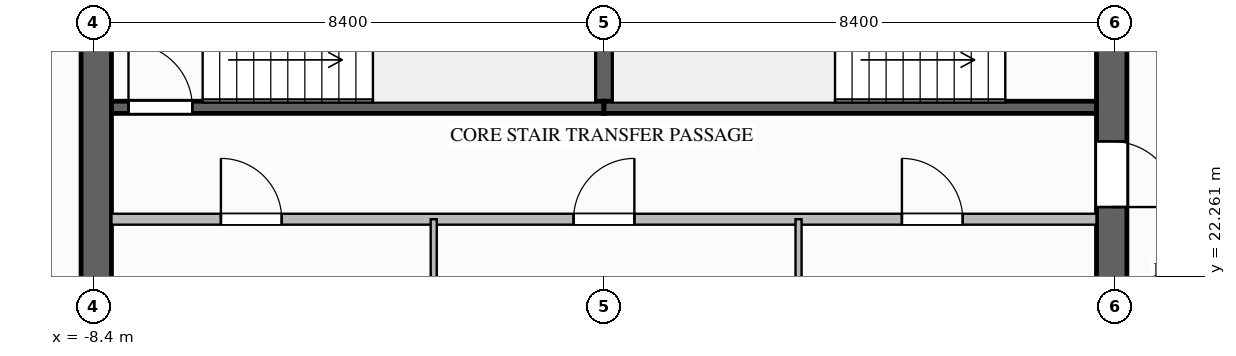
"""IFC4 building model, lengths in metres.
Left out: names, types, materials, properties, quantities, classifications, styles, units other than length and angle.
Written with IfcOpenShell. Run it as: python <this file> out.ifc"""

import sys

from ifc_helpers import new_model, si_unit, direction, frame, frame_2d, origin, place, context, subcontext, project, spatial, rectangle, extrude, element, fill, save


model = new_model("IFC4")
c1 = context("Model", 3, precision=1e-05, world=origin(), true_north=direction((0.0, 1.0)))
c2 = subcontext(c1, "Body", "Model", "MODEL_VIEW")
j1 = project(units=[si_unit("LENGTHUNIT", "METRE"), si_unit("PLANEANGLEUNIT", "RADIAN")], contexts=[c1])
p1 = place(None, origin())
s1 = spatial("IfcSite", under=j1, at=p1, CompositionType="ELEMENT")
p2 = place(p1, origin())
s2 = spatial("IfcBuilding", under=s1, at=p2, CompositionType="ELEMENT")
p3 = place(p2, frame((0.0, 0.0, 237.5)))
s3 = spatial("IfcBuildingStorey", under=s2, at=p3, CompositionType="ELEMENT", Elevation=237.5)
p4 = place(p3, frame((8.35, 35.1, 0.0), z_axis=(0.0, 0.0, 1.0), x_axis=(0.0, -1.0, 0.0)))
e1 = element("IfcWall", 1, at=p4, inside=s3, PredefinedType="SHEAR", context=c2, shape_type="SweptSolid", body=[
    extrude(rectangle(XDim=16.2, YDim=0.5, at=frame_2d((8.1, 0.0))), origin(), (0.0, 0.0, 1.0), 3.6),
])
p5 = place(p4, frame((3.08, 0.0, 0.0)))
e2 = element("IfcOpeningElement", 2, at=p5, cuts=e1, PredefinedType="OPENING", context=c2, shape_type="SweptSolid", body=[
    extrude(rectangle(XDim=1.12, YDim=2.1, at=frame_2d((0.56, 1.05))), frame((0.0, 0.26, 0.0), z_axis=(0.0, -1.0, 0.0), x_axis=(1.0, 0.0, 0.0)), (0.0, 0.0, 1.0), 0.52),
])
p6 = place(p4, frame((10.62, 0.0, 0.0)))
e3 = element("IfcOpeningElement", 3, at=p6, cuts=e1, PredefinedType="OPENING", context=c2, shape_type="SweptSolid", body=[
    extrude(rectangle(XDim=1.08, YDim=2.04, at=frame_2d((0.54, 1.02))), frame((0.0, 0.26, 0.0), z_axis=(0.0, -1.0, 0.0), x_axis=(1.0, 0.0, 0.0)), (0.0, 0.0, 1.0), 0.52),
])
p7 = place(p3, frame((-8.35, 18.9, 0.0), z_axis=(0.0, 0.0, 1.0), x_axis=(0.0, 1.0, 0.0)))
e4 = element("IfcWall", 4, at=p7, inside=s3, PredefinedType="SHEAR", context=c2, shape_type="SweptSolid", body=[
    extrude(rectangle(XDim=16.2, YDim=0.5, at=frame_2d((8.1, 0.0))), origin(), (0.0, 0.0, 1.0), 3.6),
])
p8 = place(p3, frame((0.0, 25.04, 0.0), z_axis=(0.0, 0.0, 1.0), x_axis=(0.0, 1.0, 0.0)))
e5 = element("IfcWall", 5, at=p8, inside=s3, PredefinedType="SOLIDWALL", context=c2, shape_type="SweptSolid", body=[
    extrude(rectangle(XDim=3.12, YDim=0.3, at=frame_2d((1.56, 0.0))), origin(), (0.0, 0.0, 1.0), 3.34),
])
p9 = place(p3, frame((-8.1, 25.04, 0.0), z_axis=(0.0, 0.0, 1.0), x_axis=(1.0, 0.0, 0.0)))
e6 = element("IfcWall", 6, at=p9, inside=s3, PredefinedType="SOLIDWALL", context=c2, shape_type="SweptSolid", body=[
    extrude(rectangle(XDim=8.1, YDim=0.2, at=frame_2d((4.05, 0.0))), origin(), (0.0, 0.0, 1.0), 3.34),
])
p10 = place(p9, frame((0.28, 0.0, 0.0)))
e7 = element("IfcOpeningElement", 7, at=p10, cuts=e6, PredefinedType="OPENING", context=c2, shape_type="SweptSolid", body=[
    extrude(rectangle(XDim=1.05, YDim=2.1, at=frame_2d((0.525, 1.05))), frame((0.0, 0.11, 0.0), z_axis=(0.0, -1.0, 0.0), x_axis=(1.0, 0.0, 0.0)), (0.0, 0.0, 1.0), 0.22),
])
p11 = place(p3, frame((0.0, 25.04, 0.0), z_axis=(0.0, 0.0, 1.0), x_axis=(1.0, 0.0, 0.0)))
e8 = element("IfcWall", 8, at=p11, inside=s3, PredefinedType="SOLIDWALL", context=c2, shape_type="SweptSolid", body=[
    extrude(rectangle(XDim=8.1, YDim=0.2, at=frame_2d((4.05, 0.0))), origin(), (0.0, 0.0, 1.0), 3.34),
])
p12 = place(p3, frame((-8.1, 23.2, 0.0), z_axis=(0.0, 0.0, 1.0), x_axis=(1.0, 0.0, 0.0)))
e9 = element("IfcWall", 9, at=p12, inside=s3, PredefinedType="SOLIDWALL", context=c2, shape_type="SweptSolid", body=[
    extrude(rectangle(XDim=16.2, YDim=0.18, at=frame_2d((8.1, 0.0))), origin(), (0.0, 0.0, 1.0), 3.34),
])
p13 = place(p12, frame((1.8, 0.0, 0.0)))
e10 = element("IfcOpeningElement", 10, at=p13, cuts=e9, PredefinedType="OPENING", context=c2, shape_type="SweptSolid", body=[
    extrude(rectangle(XDim=1.0, YDim=2.1, at=frame_2d((0.5, 1.05))), frame((0.0, 0.1, 0.0), z_axis=(0.0, -1.0, 0.0), x_axis=(1.0, 0.0, 0.0)), (0.0, 0.0, 1.0), 0.2),
])
p14 = place(p12, frame((7.6, 0.0, 0.0)))
e11 = element("IfcOpeningElement", 11, at=p14, cuts=e9, PredefinedType="OPENING", context=c2, shape_type="SweptSolid", body=[
    extrude(rectangle(XDim=1.0, YDim=2.1, at=frame_2d((0.5, 1.05))), frame((0.0, 0.1, 0.0), z_axis=(0.0, -1.0, 0.0), x_axis=(1.0, 0.0, 0.0)), (0.0, 0.0, 1.0), 0.2),
])
p15 = place(p12, frame((13.0, 0.0, 0.0)))
e12 = element("IfcOpeningElement", 12, at=p15, cuts=e9, PredefinedType="OPENING", context=c2, shape_type="SweptSolid", body=[
    extrude(rectangle(XDim=1.0, YDim=2.1, at=frame_2d((0.5, 1.05))), frame((0.0, 0.1, 0.0), z_axis=(0.0, -1.0, 0.0), x_axis=(1.0, 0.0, 0.0)), (0.0, 0.0, 1.0), 0.2),
])
for number, where, z_axis, x_axis in (
    (13, (-2.8, 18.9, 0.0), (0.0, 0.0, 1.0), (0.0, 1.0, 0.0)),
    (14, (3.2, 18.9, 0.0), (0.0, 0.0, 1.0), (0.0, 1.0, 0.0)),
):
    element("IfcWall", number, at=place(p3, frame(where, z_axis=z_axis, x_axis=x_axis)), inside=s3, PredefinedType="PARTITIONING", context=c2, shape_type="SweptSolid", body=[
        extrude(rectangle(XDim=4.3, YDim=0.1, at=frame_2d((2.15, 0.0))), origin(), (0.0, 0.0, 1.0), 3.34),
    ])
p16 = place(p10, origin())
e15 = element("IfcDoor", 15, at=p16, inside=s3, OperationType="SINGLE_SWING_LEFT", PredefinedType="DOOR", context=c2, shape_type="SweptSolid", body=[
    extrude(rectangle(XDim=1.05, YDim=2.1, at=frame_2d((0.525, 1.05))), frame((0.0, 0.025, 0.0), z_axis=(0.0, -1.0, 0.0), x_axis=(1.0, 0.0, 0.0)), (0.0, 0.0, 1.0), 0.05),
])
fill(e7, e15)
p17 = place(p6, origin())
e16 = element("IfcDoor", 16, at=p17, inside=s3, OperationType="SINGLE_SWING_RIGHT", PredefinedType="DOOR", context=c2, shape_type="SweptSolid", body=[
    extrude(rectangle(XDim=1.08, YDim=2.04, at=frame_2d((0.54, 1.02))), frame((0.0, 0.025, 0.0), z_axis=(0.0, -1.0, 0.0), x_axis=(1.0, 0.0, 0.0)), (0.0, 0.0, 1.0), 0.05),
])
fill(e3, e16)
p18 = place(p13, origin())
e17 = element("IfcDoor", 17, at=p18, inside=s3, OperationType="SINGLE_SWING_LEFT", PredefinedType="DOOR", context=c2, shape_type="SweptSolid", body=[
    extrude(rectangle(XDim=1.0, YDim=2.1, at=frame_2d((0.5, 1.05))), frame((0.0, 0.025, 0.0), z_axis=(0.0, -1.0, 0.0), x_axis=(1.0, 0.0, 0.0)), (0.0, 0.0, 1.0), 0.05),
])
fill(e10, e17)
p19 = place(p14, origin())
e18 = element("IfcDoor", 18, at=p19, inside=s3, OperationType="SINGLE_SWING_RIGHT", PredefinedType="DOOR", context=c2, shape_type="SweptSolid", body=[
    extrude(rectangle(XDim=1.0, YDim=2.1, at=frame_2d((0.5, 1.05))), frame((0.0, 0.025, 0.0), z_axis=(0.0, -1.0, 0.0), x_axis=(1.0, 0.0, 0.0)), (0.0, 0.0, 1.0), 0.05),
])
fill(e11, e18)
p20 = place(p15, origin())
e19 = element("IfcDoor", 19, at=p20, inside=s3, OperationType="SINGLE_SWING_LEFT", PredefinedType="DOOR", context=c2, shape_type="SweptSolid", body=[
    extrude(rectangle(XDim=1.0, YDim=2.1, at=frame_2d((0.5, 1.05))), frame((0.0, 0.025, 0.0), z_axis=(0.0, -1.0, 0.0), x_axis=(1.0, 0.0, 0.0)), (0.0, 0.0, 1.0), 0.05),
])
fill(e12, e19)
save(model, sys.argv[1])
